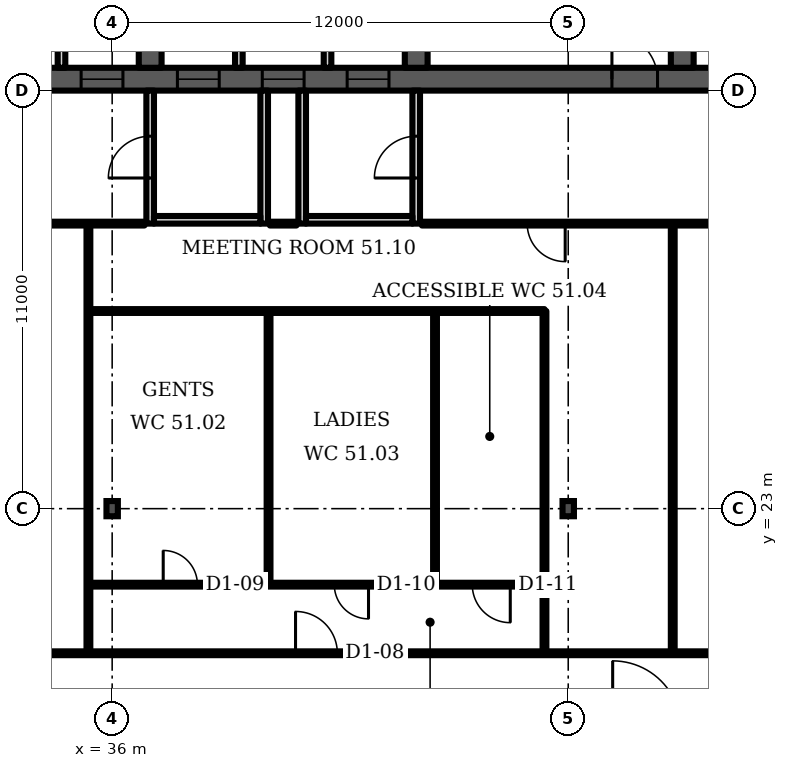
"""IFC4 building model, lengths in metres.
Left out: names, types, materials, properties, quantities, classifications, styles, units other than length and angle.
Written with IfcOpenShell. Run it as: python <this file> out.ifc"""

import sys

from ifc_helpers import new_model, si_unit, direction, frame, frame_2d, origin, origin_2d, place, context, subcontext, project, spatial, polyline, rectangle, i_section, outline, extrude, element, fill, save


model = new_model("IFC4")
c1 = context("Model", 3, precision=1e-05, world=origin(), true_north=direction((0.0, 1.0)))
c2 = subcontext(c1, "Body", "Model", "MODEL_VIEW")
j1 = project(units=[si_unit("LENGTHUNIT", "METRE"), si_unit("PLANEANGLEUNIT", "RADIAN")], contexts=[c1])
p1 = place(None, origin())
s1 = spatial("IfcSite", under=j1, at=p1, CompositionType="ELEMENT")
p2 = place(p1, origin())
s2 = spatial("IfcBuilding", under=s1, at=p2, CompositionType="ELEMENT")
p3 = place(p2, frame((0.0, 0.0, 207.1)))
s3 = spatial("IfcBuildingStorey", under=s2, at=p3, CompositionType="ELEMENT", Elevation=207.1)
p4 = place(p3, frame((23.0, 34.3, 0.0), z_axis=(0.0, 0.0, 1.0), x_axis=(1.0, 0.0, 0.0)))
e1 = element("IfcWall", 1, at=p4, inside=s3, PredefinedType="SHEAR", context=c2, shape_type="SweptSolid", body=[
    extrude(rectangle(XDim=35.0, YDim=0.6, at=frame_2d((17.5, 0.0))), origin(), (0.0, 0.0, 1.0), 3.6),
])
p5 = place(p4, frame((0.65, 0.0, 0.0)))
e2 = element("IfcOpeningElement", 2, at=p5, cuts=e1, PredefinedType="OPENING", context=c2, shape_type="SweptSolid", body=[
    extrude(rectangle(XDim=1.2, YDim=2.1, at=frame_2d((0.6, 1.05))), frame((0.0, 0.31, 0.0), z_axis=(0.0, -1.0, 0.0), x_axis=(1.0, 0.0, 0.0)), (0.0, 0.0, 1.0), 0.62),
])
p6 = place(p4, frame((7.717, 0.0, 0.0)))
e3 = element("IfcOpeningElement", 3, at=p6, cuts=e1, PredefinedType="OPENING", context=c2, shape_type="SweptSolid", body=[
    extrude(rectangle(XDim=1.1, YDim=2.1, at=frame_2d((0.55, 1.05))), frame((0.0, 0.31, 0.0), z_axis=(0.0, -1.0, 0.0), x_axis=(1.0, 0.0, 0.0)), (0.0, 0.0, 1.0), 0.62),
])
p7 = place(p4, frame((12.183, 0.0, 0.0)))
e4 = element("IfcOpeningElement", 4, at=p7, cuts=e1, PredefinedType="OPENING", context=c2, shape_type="SweptSolid", body=[
    extrude(rectangle(XDim=1.1, YDim=2.1, at=frame_2d((0.55, 1.05))), frame((0.0, 0.31, 0.0), z_axis=(0.0, -1.0, 0.0), x_axis=(1.0, 0.0, 0.0)), (0.0, 0.0, 1.0), 0.62),
])
p8 = place(p4, frame((9.8, 0.0, 0.0)))
e5 = element("IfcOpeningElement", 5, at=p8, cuts=e1, PredefinedType="OPENING", context=c2, shape_type="SweptSolid", body=[
    extrude(rectangle(XDim=1.4, YDim=2.1, at=frame_2d((0.7, 1.05))), frame((0.0, 0.31, 0.0), z_axis=(0.0, -1.0, 0.0), x_axis=(1.0, 0.0, 0.0)), (0.0, 0.0, 1.0), 0.62),
])
p9 = place(p4, frame((14.717, 0.0, 0.0)))
e6 = element("IfcOpeningElement", 6, at=p9, cuts=e1, PredefinedType="OPENING", context=c2, shape_type="SweptSolid", body=[
    extrude(rectangle(XDim=1.1, YDim=2.1, at=frame_2d((0.55, 1.05))), frame((0.0, 0.31, 0.0), z_axis=(0.0, -1.0, 0.0), x_axis=(1.0, 0.0, 0.0)), (0.0, 0.0, 1.0), 0.62),
])
p10 = place(p4, frame((16.95, 0.0, 0.0)))
e7 = element("IfcOpeningElement", 7, at=p10, cuts=e1, PredefinedType="OPENING", context=c2, shape_type="SweptSolid", body=[
    extrude(rectangle(XDim=1.1, YDim=2.1, at=frame_2d((0.55, 1.05))), frame((0.0, 0.31, 0.0), z_axis=(0.0, -1.0, 0.0), x_axis=(1.0, 0.0, 0.0)), (0.0, 0.0, 1.0), 0.62),
])
p11 = place(p4, frame((19.183, 0.0, 0.0)))
e8 = element("IfcOpeningElement", 8, at=p11, cuts=e1, PredefinedType="OPENING", context=c2, shape_type="SweptSolid", body=[
    extrude(rectangle(XDim=1.1, YDim=2.1, at=frame_2d((0.55, 1.05))), frame((0.0, 0.31, 0.0), z_axis=(0.0, -1.0, 0.0), x_axis=(1.0, 0.0, 0.0)), (0.0, 0.0, 1.0), 0.62),
])
p12 = place(p4, frame((26.15, 0.0, 0.0)))
e9 = element("IfcOpeningElement", 9, at=p12, cuts=e1, PredefinedType="OPENING", context=c2, shape_type="SweptSolid", body=[
    extrude(rectangle(XDim=1.2, YDim=2.1, at=frame_2d((0.6, 1.05))), frame((0.0, 0.31, 0.0), z_axis=(0.0, -1.0, 0.0), x_axis=(1.0, 0.0, 0.0)), (0.0, 0.0, 1.0), 0.62),
])
p13 = place(p4, frame((28.767, 0.0, 0.0)))
e10 = element("IfcOpeningElement", 10, at=p13, cuts=e1, PredefinedType="OPENING", context=c2, shape_type="SweptSolid", body=[
    extrude(rectangle(XDim=1.0, YDim=2.1, at=frame_2d((0.5, 1.05))), frame((0.0, 0.31, 0.0), z_axis=(0.0, -1.0, 0.0), x_axis=(1.0, 0.0, 0.0)), (0.0, 0.0, 1.0), 0.62),
])
p14 = place(p4, frame((33.083, 0.0, 0.0)))
e11 = element("IfcOpeningElement", 11, at=p14, cuts=e1, PredefinedType="OPENING", context=c2, shape_type="SweptSolid", body=[
    extrude(rectangle(XDim=1.0, YDim=2.1, at=frame_2d((0.5, 1.05))), frame((0.0, 0.31, 0.0), z_axis=(0.0, -1.0, 0.0), x_axis=(1.0, 0.0, 0.0)), (0.0, 0.0, 1.0), 0.62),
])
p15 = place(p4, frame((30.8, 0.0, 0.0)))
e12 = element("IfcOpeningElement", 12, at=p15, cuts=e1, PredefinedType="OPENING", context=c2, shape_type="SweptSolid", body=[
    extrude(rectangle(XDim=1.4, YDim=2.1, at=frame_2d((0.7, 1.05))), frame((0.0, 0.31, 0.0), z_axis=(0.0, -1.0, 0.0), x_axis=(1.0, 0.0, 0.0)), (0.0, 0.0, 1.0), 0.62),
])
p16 = place(p3, frame((37.0, 34.6, 0.0), z_axis=(0.0, 0.0, 1.0), x_axis=(0.0, 1.0, 0.0)))
e13 = element("IfcWall", 13, at=p16, inside=s3, PredefinedType="SHEAR", context=c2, shape_type="SweptSolid", body=[
    extrude(rectangle(XDim=14.784, YDim=0.6, at=frame_2d((7.392, 0.0))), origin(), (0.0, 0.0, 1.0), 3.6),
])
p17 = place(p16, frame((11.302, 0.0, 0.0)))
e14 = element("IfcOpeningElement", 14, at=p17, cuts=e13, PredefinedType="OPENING", context=c2, shape_type="SweptSolid", body=[
    extrude(rectangle(XDim=1.0, YDim=2.1, at=frame_2d((0.5, 1.05))), frame((0.0, 0.31, 0.0), z_axis=(0.0, -1.0, 0.0), x_axis=(1.0, 0.0, 0.0)), (0.0, 0.0, 1.0), 0.62),
])
p18 = place(p16, frame((3.8, 0.0, 0.0)))
e15 = element("IfcOpeningElement", 15, at=p18, cuts=e13, PredefinedType="OPENING", context=c2, shape_type="SweptSolid", body=[
    extrude(rectangle(XDim=1.1, YDim=2.1, at=frame_2d((0.55, 1.05))), frame((0.0, 0.31, 0.0), z_axis=(0.0, -1.0, 0.0), x_axis=(1.0, 0.0, 0.0)), (0.0, 0.0, 1.0), 0.62),
])
p19 = place(p3, frame((44.0, 34.6, 0.0), z_axis=(0.0, 0.0, 1.0), x_axis=(0.0, 1.0, 0.0)))
e16 = element("IfcWall", 16, at=p19, inside=s3, PredefinedType="SHEAR", context=c2, shape_type="SweptSolid", body=[
    extrude(rectangle(XDim=14.784, YDim=0.6, at=frame_2d((7.392, 0.0))), origin(), (0.0, 0.0, 1.0), 3.6),
])
p20 = place(p19, frame((11.608, 0.0, 0.0)))
e17 = element("IfcOpeningElement", 17, at=p20, cuts=e16, PredefinedType="OPENING", context=c2, shape_type="SweptSolid", body=[
    extrude(rectangle(XDim=1.0, YDim=2.1, at=frame_2d((0.5, 1.05))), frame((0.0, 0.31, 0.0), z_axis=(0.0, -1.0, 0.0), x_axis=(1.0, 0.0, 0.0)), (0.0, 0.0, 1.0), 0.62),
])
p21 = place(p19, frame((3.8, 0.0, 0.0)))
e18 = element("IfcOpeningElement", 18, at=p21, cuts=e16, PredefinedType="OPENING", context=c2, shape_type="SweptSolid", body=[
    extrude(rectangle(XDim=1.1, YDim=2.1, at=frame_2d((0.55, 1.05))), frame((0.0, 0.31, 0.0), z_axis=(0.0, -1.0, 0.0), x_axis=(1.0, 0.0, 0.0)), (0.0, 0.0, 1.0), 0.62),
])
p22 = place(p3, frame((51.0, 34.6, 0.0), z_axis=(0.0, 0.0, 1.0), x_axis=(0.0, 1.0, 0.0)))
e19 = element("IfcWall", 19, at=p22, inside=s3, PredefinedType="SHEAR", context=c2, shape_type="SweptSolid", body=[
    extrude(rectangle(XDim=14.171, YDim=0.6, at=frame_2d((7.085, 0.0))), origin(), (0.0, 0.0, 1.0), 3.6),
])
p23 = place(p22, frame((3.8, 0.0, 0.0)))
e20 = element("IfcOpeningElement", 20, at=p23, cuts=e19, PredefinedType="OPENING", context=c2, shape_type="SweptSolid", body=[
    extrude(rectangle(XDim=1.1, YDim=2.1, at=frame_2d((0.55, 1.05))), frame((0.0, 0.31, 0.0), z_axis=(0.0, -1.0, 0.0), x_axis=(1.0, 0.0, 0.0)), (0.0, 0.0, 1.0), 0.62),
])
for number, where, z_axis, x_axis in (
    (21, (36.0, 23.0, 0.0), (0.0, 0.0, 1.0), (1.0, 0.0, 0.0)),
    (22, (48.0, 23.0, 0.0), (0.0, 0.0, 1.0), (1.0, 0.0, 0.0)),
):
    element("IfcColumn", number, at=place(p3, frame(where, z_axis=z_axis, x_axis=x_axis)), inside=s3, PredefinedType="COLUMN", context=c2, shape_type="SweptSolid", body=[
        extrude(i_section(OverallWidth=0.3, OverallDepth=0.4, WebThickness=0.013, FlangeThickness=0.024, FilletRadius=0.027, at=origin_2d()), origin(), (0.0, 0.0, 1.0), 3.6),
    ])
p24 = place(p3, frame((0.0, 0.0, -0.0)))
e23 = element("IfcWall", 23, at=p24, inside=s3, PredefinedType="PARTITIONING", context=c2, shape_type="SweptSolid", body=[
    extrude(outline(polyline([(34.567, 37.65), (34.767, 37.65), (36.7, 37.65), (36.7, 37.45), (34.767, 37.45), (34.767, 34.6), (34.567, 34.6), (34.567, 37.65)])), origin(), (0.0, 0.0, 1.0), 3.2),
])
p25 = place(p3, frame((0.0, 0.0, -0.0)))
e24 = element("IfcWall", 24, at=p25, inside=s3, PredefinedType="PARTITIONING", context=c2, shape_type="SweptSolid", body=[
    extrude(outline(polyline([(41.567, 37.1), (39.433, 37.1), (39.433, 34.6), (39.233, 34.6), (39.233, 37.45), (37.3, 37.45), (37.3, 37.65), (39.233, 37.65), (39.433, 37.65), (39.433, 37.3), (41.567, 37.3), (41.567, 37.35), (41.767, 37.35), (43.7, 37.35), (43.7, 37.15), (41.767, 37.15), (41.767, 34.6), (41.567, 34.6), (41.567, 37.1)])), origin(), (0.0, 0.0, 1.0), 3.2),
])
p26 = place(p3, frame((37.0, 30.5, 0.0), z_axis=(0.0, 0.0, 1.0), x_axis=(0.0, 1.0, 0.0)))
e25 = element("IfcWall", 25, at=p26, inside=s3, PredefinedType="PARTITIONING", context=c2, shape_type="SweptSolid", body=[
    extrude(rectangle(XDim=3.5, YDim=0.2, at=frame_2d((1.75, 0.0))), origin(), (0.0, 0.0, 1.0), 3.2),
])
p27 = place(p26, frame((1.2, 0.0, 0.0)))
e26 = element("IfcOpeningElement", 26, at=p27, cuts=e25, PredefinedType="OPENING", context=c2, shape_type="SweptSolid", body=[
    extrude(rectangle(XDim=1.1, YDim=2.1, at=frame_2d((0.55, 1.05))), frame((0.0, 0.11, 0.0), z_axis=(0.0, -1.0, 0.0), x_axis=(1.0, 0.0, 0.0)), (0.0, 0.0, 1.0), 0.22),
])
p28 = place(p3, frame((40.0, 30.5, 0.0), z_axis=(0.0, 0.0, 1.0), x_axis=(0.0, 1.0, 0.0)))
e27 = element("IfcWall", 27, at=p28, inside=s3, PredefinedType="PARTITIONING", context=c2, shape_type="SweptSolid", body=[
    extrude(rectangle(XDim=3.5, YDim=0.2, at=frame_2d((1.75, 0.0))), origin(), (0.0, 0.0, 1.0), 3.2),
])
p29 = place(p3, frame((37.1, 30.6, 0.0), z_axis=(0.0, 0.0, 1.0), x_axis=(1.0, 0.0, 0.0)))
e28 = element("IfcWall", 28, at=p29, inside=s3, PredefinedType="PARTITIONING", context=c2, shape_type="SweptSolid", body=[
    extrude(rectangle(XDim=2.8, YDim=0.2, at=frame_2d((1.4, 0.0))), origin(), (0.0, 0.0, 1.0), 3.2),
])
p30 = place(p3, frame((41.0, 30.5, 0.0), z_axis=(0.0, 0.0, 1.0), x_axis=(0.0, 1.0, 0.0)))
e29 = element("IfcWall", 29, at=p30, inside=s3, PredefinedType="PARTITIONING", context=c2, shape_type="SweptSolid", body=[
    extrude(rectangle(XDim=3.5, YDim=0.2, at=frame_2d((1.75, 0.0))), origin(), (0.0, 0.0, 1.0), 3.2),
])
p31 = place(p3, frame((44.0, 30.5, 0.0), z_axis=(0.0, 0.0, 1.0), x_axis=(0.0, 1.0, 0.0)))
e30 = element("IfcWall", 30, at=p31, inside=s3, PredefinedType="PARTITIONING", context=c2, shape_type="SweptSolid", body=[
    extrude(rectangle(XDim=3.5, YDim=0.2, at=frame_2d((1.75, 0.0))), origin(), (0.0, 0.0, 1.0), 3.2),
])
p32 = place(p31, frame((1.2, 0.0, 0.0)))
e31 = element("IfcOpeningElement", 31, at=p32, cuts=e30, PredefinedType="OPENING", context=c2, shape_type="SweptSolid", body=[
    extrude(rectangle(XDim=1.1, YDim=2.1, at=frame_2d((0.55, 1.05))), frame((0.0, 0.11, 0.0), z_axis=(0.0, -1.0, 0.0), x_axis=(1.0, 0.0, 0.0)), (0.0, 0.0, 1.0), 0.22),
])
p33 = place(p3, frame((41.1, 30.6, 0.0), z_axis=(0.0, 0.0, 1.0), x_axis=(1.0, 0.0, 0.0)))
e32 = element("IfcWall", 32, at=p33, inside=s3, PredefinedType="PARTITIONING", context=c2, shape_type="SweptSolid", body=[
    extrude(rectangle(XDim=2.8, YDim=0.2, at=frame_2d((1.4, 0.0))), origin(), (0.0, 0.0, 1.0), 3.2),
])
p34 = place(p3, frame((24.805, 19.195, 0.0), z_axis=(0.0, 0.0, 1.0), x_axis=(1.0, 0.0, 0.0)))
e33 = element("IfcWall", 33, at=p34, inside=s3, PredefinedType="PARTITIONING", context=c2, shape_type="SweptSolid", body=[
    extrude(rectangle(XDim=40.265, YDim=0.1, at=frame_2d((20.133, 0.0))), origin(), (0.0, 0.0, 1.0), 3.2),
])
p35 = place(p34, frame((4.945, 0.0, 0.0)))
e34 = element("IfcOpeningElement", 34, at=p35, cuts=e33, PredefinedType="OPENING", context=c2, shape_type="SweptSolid", body=[
    extrude(rectangle(XDim=1.0, YDim=2.1, at=frame_2d((0.5, 1.05))), frame((0.0, 0.06, 0.0), z_axis=(0.0, -1.0, 0.0), x_axis=(1.0, 0.0, 0.0)), (0.0, 0.0, 1.0), 0.12),
])
p36 = place(p34, frame((30.57, 0.0, 0.0)))
e35 = element("IfcOpeningElement", 35, at=p36, cuts=e33, PredefinedType="OPENING", context=c2, shape_type="SweptSolid", body=[
    extrude(rectangle(XDim=1.0, YDim=2.1, at=frame_2d((0.5, 1.05))), frame((0.0, 0.06, 0.0), z_axis=(0.0, -1.0, 0.0), x_axis=(1.0, 0.0, 0.0)), (0.0, 0.0, 1.0), 0.12),
])
p37 = place(p34, frame((16.02, 0.0, 0.0)))
e36 = element("IfcOpeningElement", 36, at=p37, cuts=e33, PredefinedType="OPENING", context=c2, shape_type="SweptSolid", body=[
    extrude(rectangle(XDim=1.1, YDim=2.1, at=frame_2d((0.55, 1.05))), frame((0.0, 0.06, 0.0), z_axis=(0.0, -1.0, 0.0), x_axis=(1.0, 0.0, 0.0)), (0.0, 0.0, 1.0), 0.12),
])
p38 = place(p3, frame((29.4, 30.5, 0.0), z_axis=(0.0, 0.0, 1.0), x_axis=(1.0, 0.0, 0.0)))
e37 = element("IfcWall", 37, at=p38, inside=s3, PredefinedType="PARTITIONING", context=c2, shape_type="SweptSolid", body=[
    extrude(rectangle(XDim=7.45, YDim=0.1, at=frame_2d((3.725, 0.0))), origin(), (0.0, 0.0, 1.0), 3.2),
])
p39 = place(p3, frame((35.375, 19.205, 0.0), z_axis=(0.0, 0.0, 1.0), x_axis=(0.0, 1.0, 0.0)))
e38 = element("IfcWall", 38, at=p39, inside=s3, PredefinedType="PARTITIONING", context=c2, shape_type="SweptSolid", body=[
    extrude(rectangle(XDim=11.295, YDim=0.1, at=frame_2d((5.647, 0.0))), origin(), (0.0, 0.0, 1.0), 3.2),
])
p40 = place(p3, frame((35.375, 21.0, 0.0), z_axis=(0.0, 0.0, 1.0), x_axis=(1.0, 0.0, 0.0)))
e39 = element("IfcWall", 39, at=p40, inside=s3, PredefinedType="PARTITIONING", context=c2, shape_type="SweptSolid", body=[
    extrude(rectangle(XDim=12.0, YDim=0.1, at=frame_2d((6.0, 0.0))), origin(), (0.0, 0.0, 1.0), 3.2),
])
p41 = place(p40, frame((1.968, 0.0, 0.0)))
e40 = element("IfcOpeningElement", 40, at=p41, cuts=e39, PredefinedType="OPENING", context=c2, shape_type="SweptSolid", body=[
    extrude(rectangle(XDim=0.9, YDim=2.1, at=frame_2d((0.45, 1.05))), frame((0.0, 0.06, 0.0), z_axis=(0.0, -1.0, 0.0), x_axis=(1.0, 0.0, 0.0)), (0.0, 0.0, 1.0), 0.12),
])
p42 = place(p40, frame((6.47, 0.0, 0.0)))
e41 = element("IfcOpeningElement", 41, at=p42, cuts=e39, PredefinedType="OPENING", context=c2, shape_type="SweptSolid", body=[
    extrude(rectangle(XDim=0.9, YDim=2.1, at=frame_2d((0.45, 1.05))), frame((0.0, 0.06, 0.0), z_axis=(0.0, -1.0, 0.0), x_axis=(1.0, 0.0, 0.0)), (0.0, 0.0, 1.0), 0.12),
])
p43 = place(p40, frame((10.1, 0.0, 0.0)))
e42 = element("IfcOpeningElement", 42, at=p43, cuts=e39, PredefinedType="OPENING", context=c2, shape_type="SweptSolid", body=[
    extrude(rectangle(XDim=1.0, YDim=2.1, at=frame_2d((0.5, 1.05))), frame((0.0, 0.06, 0.0), z_axis=(0.0, -1.0, 0.0), x_axis=(1.0, 0.0, 0.0)), (0.0, 0.0, 1.0), 0.12),
])
p44 = place(p3, frame((35.375, 28.2, 0.0), z_axis=(0.0, 0.0, 1.0), x_axis=(1.0, 0.0, 0.0)))
e43 = element("IfcWall", 43, at=p44, inside=s3, PredefinedType="PARTITIONING", context=c2, shape_type="SweptSolid", body=[
    extrude(rectangle(XDim=12.0, YDim=0.1, at=frame_2d((6.0, 0.0))), origin(), (0.0, 0.0, 1.0), 3.2),
])
for number, where, z_axis, x_axis in (
    (44, (40.115, 21.0, 0.0), (0.0, 0.0, 1.0), (0.0, 1.0, 0.0)),
    (45, (44.495, 21.0, 0.0), (0.0, 0.0, 1.0), (0.0, 1.0, 0.0)),
):
    element("IfcWall", number, at=place(p3, frame(where, z_axis=z_axis, x_axis=x_axis)), inside=s3, PredefinedType="PARTITIONING", context=c2, shape_type="SweptSolid", body=[
        extrude(rectangle(XDim=7.2, YDim=0.1, at=frame_2d((3.6, 0.0))), origin(), (0.0, 0.0, 1.0), 3.2),
    ])
p45 = place(p3, frame((47.375, 19.205, 0.0), z_axis=(0.0, 0.0, 1.0), x_axis=(0.0, 1.0, 0.0)))
e46 = element("IfcWall", 46, at=p45, inside=s3, PredefinedType="PARTITIONING", context=c2, shape_type="SweptSolid", body=[
    extrude(rectangle(XDim=8.995, YDim=0.1, at=frame_2d((4.498, 0.0))), origin(), (0.0, 0.0, 1.0), 3.2),
])
p46 = place(p3, frame((50.75, 19.2, 0.0), z_axis=(0.0, 0.0, 1.0), x_axis=(0.0, 1.0, 0.0)))
e47 = element("IfcWall", 47, at=p46, inside=s3, PredefinedType="PARTITIONING", context=c2, shape_type="SweptSolid", body=[
    extrude(rectangle(XDim=11.3, YDim=0.1, at=frame_2d((5.65, 0.0))), origin(), (0.0, 0.0, 1.0), 3.2),
])
p47 = place(p3, frame((40.15, 30.5, 0.0), z_axis=(0.0, 0.0, 1.0), x_axis=(1.0, 0.0, 0.0)))
e48 = element("IfcWall", 48, at=p47, inside=s3, PredefinedType="PARTITIONING", context=c2, shape_type="SweptSolid", body=[
    extrude(rectangle(XDim=0.7, YDim=0.1, at=frame_2d((0.35, 0.0))), origin(), (0.0, 0.0, 1.0), 3.2),
])
p48 = place(p3, frame((44.15, 30.5, 0.0), z_axis=(0.0, 0.0, 1.0), x_axis=(1.0, 0.0, 0.0)))
e49 = element("IfcWall", 49, at=p48, inside=s3, PredefinedType="PARTITIONING", context=c2, shape_type="SweptSolid", body=[
    extrude(rectangle(XDim=13.85, YDim=0.1, at=frame_2d((6.925, 0.0))), origin(), (0.0, 0.0, 1.0), 3.2),
])
p49 = place(p48, frame((2.77, 0.0, 0.0)))
e50 = element("IfcOpeningElement", 50, at=p49, cuts=e49, PredefinedType="OPENING", context=c2, shape_type="SweptSolid", body=[
    extrude(rectangle(XDim=1.0, YDim=2.1, at=frame_2d((0.5, 1.05))), frame((0.0, 0.06, 0.0), z_axis=(0.0, -1.0, 0.0), x_axis=(1.0, 0.0, 0.0)), (0.0, 0.0, 1.0), 0.12),
])
p50 = place(p7, origin())
e51 = element("IfcDoor", 51, at=p50, inside=s3, OperationType="DOUBLE_DOOR_SLIDING", PredefinedType="DOOR", context=c2, shape_type="SweptSolid", body=[
    extrude(rectangle(XDim=1.1, YDim=2.1, at=frame_2d((0.55, 1.05))), frame((0.0, 0.025, 0.0), z_axis=(0.0, -1.0, 0.0), x_axis=(1.0, 0.0, 0.0)), (0.0, 0.0, 1.0), 0.05),
])
fill(e4, e51)
p51 = place(p9, origin())
e52 = element("IfcDoor", 52, at=p51, inside=s3, OperationType="DOUBLE_DOOR_SLIDING", PredefinedType="DOOR", context=c2, shape_type="SweptSolid", body=[
    extrude(rectangle(XDim=1.1, YDim=2.1, at=frame_2d((0.55, 1.05))), frame((0.0, 0.025, 0.0), z_axis=(0.0, -1.0, 0.0), x_axis=(1.0, 0.0, 0.0)), (0.0, 0.0, 1.0), 0.05),
])
fill(e6, e52)
p52 = place(p10, origin())
e53 = element("IfcDoor", 53, at=p52, inside=s3, OperationType="DOUBLE_DOOR_SLIDING", PredefinedType="DOOR", context=c2, shape_type="SweptSolid", body=[
    extrude(rectangle(XDim=1.1, YDim=2.1, at=frame_2d((0.55, 1.05))), frame((0.0, 0.025, 0.0), z_axis=(0.0, -1.0, 0.0), x_axis=(1.0, 0.0, 0.0)), (0.0, 0.0, 1.0), 0.05),
])
fill(e7, e53)
p53 = place(p11, origin())
e54 = element("IfcDoor", 54, at=p53, inside=s3, OperationType="DOUBLE_DOOR_SLIDING", PredefinedType="DOOR", context=c2, shape_type="SweptSolid", body=[
    extrude(rectangle(XDim=1.1, YDim=2.1, at=frame_2d((0.55, 1.05))), frame((0.0, 0.025, 0.0), z_axis=(0.0, -1.0, 0.0), x_axis=(1.0, 0.0, 0.0)), (0.0, 0.0, 1.0), 0.05),
])
fill(e8, e54)
p54 = place(p12, origin())
e55 = element("IfcDoor", 55, at=p54, inside=s3, OperationType="SINGLE_SWING_LEFT", PredefinedType="DOOR", context=c2, shape_type="SweptSolid", body=[
    extrude(rectangle(XDim=1.2, YDim=2.1, at=frame_2d((0.6, 1.05))), frame((0.0, 0.025, 0.0), z_axis=(0.0, -1.0, 0.0), x_axis=(1.0, 0.0, 0.0)), (0.0, 0.0, 1.0), 0.05),
])
fill(e9, e55)
p55 = place(p27, origin())
e56 = element("IfcDoor", 56, at=p55, inside=s3, OperationType="SINGLE_SWING_LEFT", PredefinedType="DOOR", context=c2, shape_type="SweptSolid", body=[
    extrude(rectangle(XDim=1.1, YDim=2.1, at=frame_2d((0.55, 1.05))), frame((0.0, 0.025, 0.0), z_axis=(0.0, -1.0, 0.0), x_axis=(1.0, 0.0, 0.0)), (0.0, 0.0, 1.0), 0.05),
])
fill(e26, e56)
p56 = place(p32, origin())
e57 = element("IfcDoor", 57, at=p56, inside=s3, OperationType="SINGLE_SWING_LEFT", PredefinedType="DOOR", context=c2, shape_type="SweptSolid", body=[
    extrude(rectangle(XDim=1.1, YDim=2.1, at=frame_2d((0.55, 1.05))), frame((0.0, 0.025, 0.0), z_axis=(0.0, -1.0, 0.0), x_axis=(1.0, 0.0, 0.0)), (0.0, 0.0, 1.0), 0.05),
])
fill(e31, e57)
p57 = place(p37, origin())
e58 = element("IfcDoor", 58, at=p57, inside=s3, OperationType="SINGLE_SWING_LEFT", PredefinedType="DOOR", context=c2, shape_type="SweptSolid", body=[
    extrude(rectangle(XDim=1.1, YDim=2.1, at=frame_2d((0.55, 1.05))), frame((0.0, 0.025, 0.0), z_axis=(0.0, -1.0, 0.0), x_axis=(1.0, 0.0, 0.0)), (0.0, 0.0, 1.0), 0.05),
])
fill(e36, e58)
p58 = place(p41, origin())
e59 = element("IfcDoor", 59, at=p58, inside=s3, OperationType="SINGLE_SWING_LEFT", PredefinedType="DOOR", context=c2, shape_type="SweptSolid", body=[
    extrude(rectangle(XDim=0.9, YDim=2.1, at=frame_2d((0.45, 1.05))), frame((0.0, 0.025, 0.0), z_axis=(0.0, -1.0, 0.0), x_axis=(1.0, 0.0, 0.0)), (0.0, 0.0, 1.0), 0.05),
])
fill(e40, e59)
p59 = place(p42, origin())
e60 = element("IfcDoor", 60, at=p59, inside=s3, OperationType="SINGLE_SWING_RIGHT", PredefinedType="DOOR", context=c2, shape_type="SweptSolid", body=[
    extrude(rectangle(XDim=0.9, YDim=2.1, at=frame_2d((0.45, 1.05))), frame((0.0, 0.025, 0.0), z_axis=(0.0, -1.0, 0.0), x_axis=(1.0, 0.0, 0.0)), (0.0, 0.0, 1.0), 0.05),
])
fill(e41, e60)
p60 = place(p43, origin())
e61 = element("IfcDoor", 61, at=p60, inside=s3, OperationType="SINGLE_SWING_RIGHT", PredefinedType="DOOR", context=c2, shape_type="SweptSolid", body=[
    extrude(rectangle(XDim=1.0, YDim=2.1, at=frame_2d((0.5, 1.05))), frame((0.0, 0.025, 0.0), z_axis=(0.0, -1.0, 0.0), x_axis=(1.0, 0.0, 0.0)), (0.0, 0.0, 1.0), 0.05),
])
fill(e42, e61)
p61 = place(p49, origin())
e62 = element("IfcDoor", 62, at=p61, inside=s3, OperationType="SINGLE_SWING_RIGHT", PredefinedType="DOOR", context=c2, shape_type="SweptSolid", body=[
    extrude(rectangle(XDim=1.0, YDim=2.1, at=frame_2d((0.5, 1.05))), frame((0.0, 0.025, 0.0), z_axis=(0.0, -1.0, 0.0), x_axis=(1.0, 0.0, 0.0)), (0.0, 0.0, 1.0), 0.05),
])
fill(e50, e62)
save(model, sys.argv[1])
